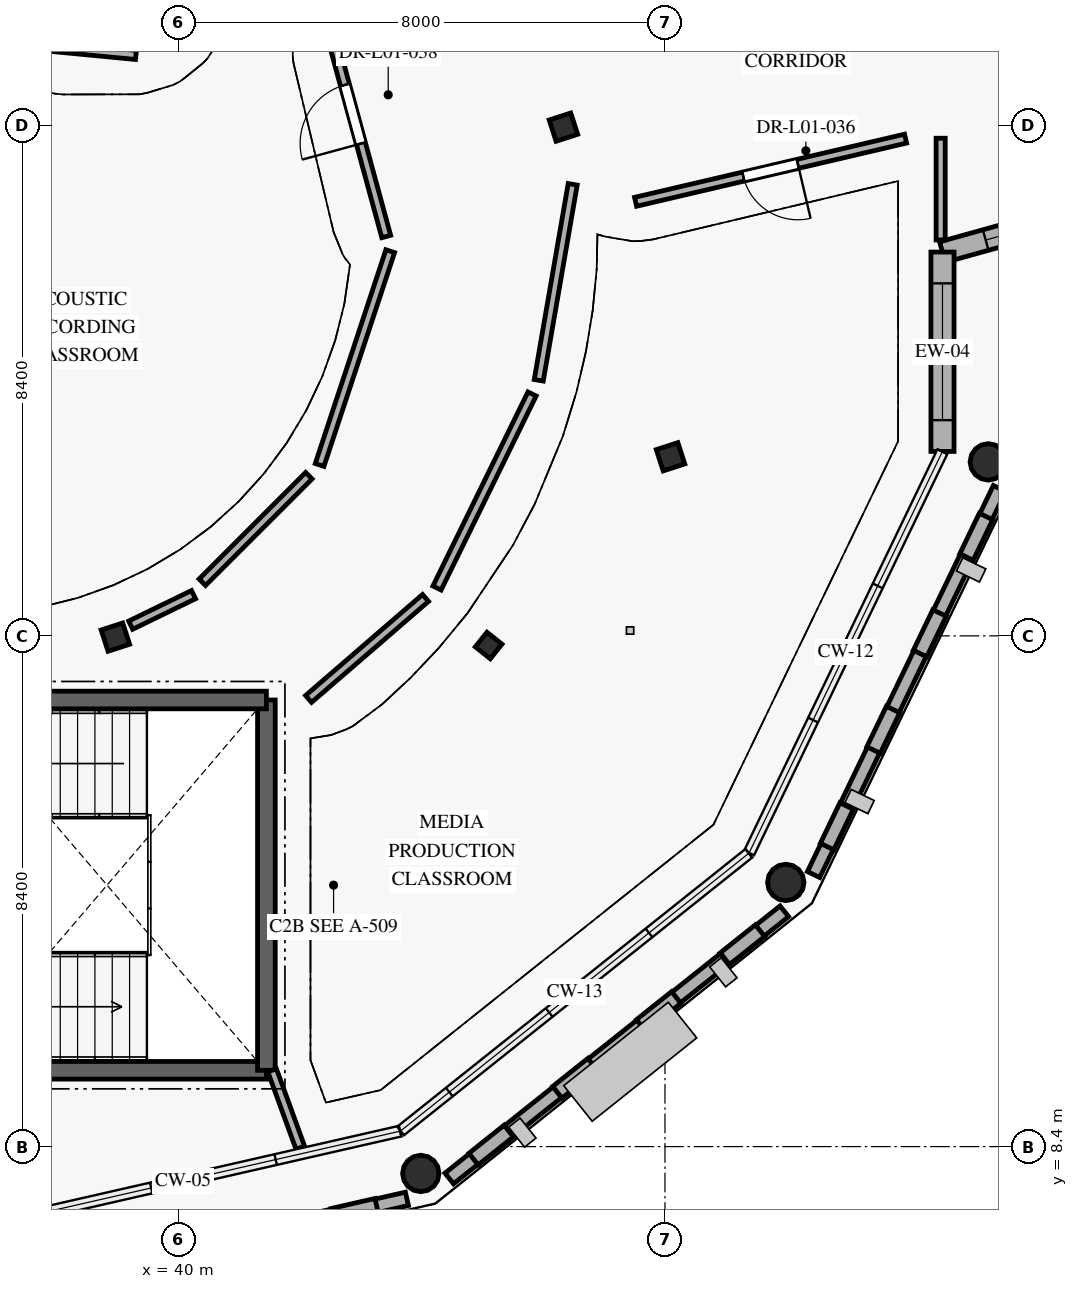
"""IFC4 building model, lengths in metres.
Left out: names, types, materials, properties, quantities, classifications, styles, units other than length and angle.
Written with IfcOpenShell. Run it as: python <this file> out.ifc"""

import sys

from ifc_helpers import new_model, si_unit, direction, frame, frame_2d, origin, origin_2d, place, context, subcontext, project, spatial, rectangle, circle, i_section, extrude, element, fill, save


model = new_model("IFC4")
c1 = context("Model", 3, precision=1e-05, world=origin(), true_north=direction((0.0, 1.0)))
c2 = subcontext(c1, "Body", "Model", "MODEL_VIEW")
j1 = project(units=[si_unit("LENGTHUNIT", "METRE"), si_unit("PLANEANGLEUNIT", "RADIAN")], contexts=[c1])
p1 = place(None, origin())
s1 = spatial("IfcSite", under=j1, at=p1, CompositionType="ELEMENT")
p2 = place(p1, origin())
s2 = spatial("IfcBuilding", under=s1, at=p2, CompositionType="ELEMENT")
p3 = place(p2, frame((0.0, 0.0, 4.2)))
s3 = spatial("IfcBuildingStorey", under=s2, at=p3, CompositionType="ELEMENT", Elevation=4.2)
for number, where, z_axis, x_axis in (
    (1, (38.961, 16.779, 0.0), (0.0, 0.0, 1.0), (0.951, 0.309, 0.0)),
    (2, (48.092, 19.746, 0.0), (0.0, 0.0, 1.0), (0.951, 0.309, 0.0)),
    (3, (46.33, 25.167, 0.0), (0.0, 0.0, 1.0), (0.951, 0.309, 0.0)),
):
    element("IfcColumn", number, at=place(p3, frame(where, z_axis=z_axis, x_axis=x_axis)), inside=s3, PredefinedType="COLUMN", context=c2, shape_type="SweptSolid", body=[
        extrude(i_section(OverallWidth=0.373, OverallDepth=0.368, WebThickness=0.014, FlangeThickness=0.024, FilletRadius=0.015, at=origin_2d()), origin(), (0.0, 0.0, 1.0), 4.2),
    ])
for number, where, z_axis, x_axis in (
    (4, (43.985, 7.958, 0.0), (0.0, 0.0, 1.0), (0.901, 0.434, 0.0)),
    (5, (49.987, 12.745, 0.0), (0.0, 0.0, 1.0), (0.623, 0.782, 0.0)),
    (6, (53.317, 19.662, 0.0), (0.0, 0.0, 1.0), (0.223, 0.975, 0.0)),
):
    element("IfcColumn", number, at=place(p3, frame(where, z_axis=z_axis, x_axis=x_axis)), inside=s3, PredefinedType="COLUMN", context=c2, shape_type="SweptSolid", body=[
        extrude(circle(Radius=0.3, at=origin_2d()), origin(), (0.0, 0.0, 1.0), 4.2),
    ])
p4 = place(p3, frame((45.1, 16.642, 0.0), z_axis=(0.0, 0.0, 1.0), x_axis=(0.623470308046, 0.781847027868, 0.0)))
e7 = element("IfcColumn", 7, at=p4, inside=s3, PredefinedType="COLUMN", context=c2, shape_type="SweptSolid", body=[
    extrude(i_section(OverallWidth=0.307, OverallDepth=0.314, WebThickness=0.012, FlangeThickness=0.019, FilletRadius=0.015, at=origin_2d()), origin(), (0.0, 0.0, 1.0), 4.2),
])
p5 = place(p3, frame((59.259, 24.975, 0.0), z_axis=(0.0, 0.0, 1.0), x_axis=(-0.963400554219, -0.268065984658, 0.0)))
e8 = element("IfcWall", 8, at=p5, inside=s3, PredefinedType="SOLIDWALL", context=c2, shape_type="SweptSolid", body=[
    extrude(rectangle(XDim=6.95, YDim=0.35, at=frame_2d((3.475, 0.0))), origin(), (0.0, 0.0, 1.0), 3.94),
])
p6 = place(p5, frame((0.988, 0.0, 0.85)))
e9 = element("IfcOpeningElement", 9, at=p6, cuts=e8, PredefinedType="OPENING", context=c2, shape_type="SweptSolid", body=[
    extrude(rectangle(XDim=1.5, YDim=1.3, at=frame_2d((0.75, 0.65))), frame((0.0, 0.185, 0.0), z_axis=(0.0, -1.0, 0.0), x_axis=(1.0, 0.0, 0.0)), (0.0, 0.0, 1.0), 0.37),
])
p7 = place(p5, frame((4.212, 0.0, 0.85)))
e10 = element("IfcOpeningElement", 10, at=p7, cuts=e8, PredefinedType="OPENING", context=c2, shape_type="SweptSolid", body=[
    extrude(rectangle(XDim=2.0, YDim=1.3, at=frame_2d((1.0, 0.65))), frame((0.0, 0.185, 0.0), z_axis=(0.0, -1.0, 0.0), x_axis=(1.0, 0.0, 0.0)), (0.0, 0.0, 1.0), 0.37),
])
p8 = place(p3, frame((52.564, 23.112, 0.0), z_axis=(0.0, 0.0, 1.0), x_axis=(0.0, -1.0, 0.0)))
e11 = element("IfcWall", 11, at=p8, inside=s3, PredefinedType="SOLIDWALL", context=c2, shape_type="SweptSolid", body=[
    extrude(rectangle(XDim=3.279, YDim=0.38, at=frame_2d((1.639, 0.0))), origin(), (0.0, 0.0, 1.0), 3.94),
])
p9 = place(p8, frame((0.514, 0.0, 0.85)))
e12 = element("IfcOpeningElement", 12, at=p9, cuts=e11, PredefinedType="OPENING", context=c2, shape_type="SweptSolid", body=[
    extrude(rectangle(XDim=2.25, YDim=1.3, at=frame_2d((1.125, 0.65))), frame((0.0, 0.2, 0.0), z_axis=(0.0, -1.0, 0.0), x_axis=(1.0, 0.0, 0.0)), (0.0, 0.0, 1.0), 0.4),
])
p10 = place(p3, frame((36.886, 5.973, 0.0), z_axis=(0.0, 0.0, 1.0), x_axis=(0.974930278984, 0.222510564064, 0.0)))
e13 = element("IfcWall", 13, at=p10, inside=s3, PredefinedType="ELEMENTEDWALL", context=c2, shape_type="SweptSolid", body=[
    extrude(rectangle(XDim=7.046, YDim=0.225, at=frame_2d((3.523, 0.0))), origin(), (0.0, 0.0, 1.0), 1.09),
])
p11 = place(p3, frame((42.537, 7.262, 1.09), z_axis=(0.0, 0.0, 1.0), x_axis=(0.974960788757, 0.222376843189, 0.0)))
e14 = element("IfcWall", 14, at=p11, inside=s3, PredefinedType="ELEMENTEDWALL", context=c2, shape_type="SweptSolid", body=[
    extrude(rectangle(XDim=0.74, YDim=0.245, at=frame_2d((0.37, 0.0))), origin(), (0.0, 0.0, 1.0), 2.85),
])
p12 = place(p3, frame((44.452, 7.876, 0.0), z_axis=(0.0, 0.0, 1.0), x_axis=(0.781844515492, 0.623473458613, 0.0)))
e15 = element("IfcWall", 15, at=p12, inside=s3, PredefinedType="ELEMENTEDWALL", context=c2, shape_type="SweptSolid", body=[
    extrude(rectangle(XDim=7.048, YDim=0.225, at=frame_2d((3.524, 0.0))), origin(), (0.0, 0.0, 1.0), 1.09),
])
for number, where, z_axis, x_axis in (
    (16, (44.852, 8.194, 1.09), (0.0, 0.0, 1.0), (0.782, 0.623, 0.0)),
    (17, (46.229, 9.293, 1.09), (0.0, 0.0, 1.0), (0.782, 0.623, 0.0)),
    (18, (47.607, 10.392, 1.09), (0.0, 0.0, 1.0), (0.782, 0.623, 0.0)),
    (19, (48.985, 11.49, 1.09), (0.0, 0.0, 1.0), (0.782, 0.623, 0.0)),
):
    element("IfcWall", number, at=place(p3, frame(where, z_axis=z_axis, x_axis=x_axis)), inside=s3, PredefinedType="ELEMENTEDWALL", context=c2, shape_type="SweptSolid", body=[
        extrude(rectangle(XDim=0.74, YDim=0.245, at=frame_2d((0.37, 0.0))), origin(), (0.0, 0.0, 1.0), 2.85),
    ])
p13 = place(p3, frame((50.444, 12.875, 0.0), z_axis=(0.0, 0.0, 1.0), x_axis=(0.433874990127, 0.900973081142, 0.0)))
e20 = element("IfcWall", 20, at=p13, inside=s3, PredefinedType="ELEMENTEDWALL", context=c2, shape_type="SweptSolid", body=[
    extrude(rectangle(XDim=7.047, YDim=0.225, at=frame_2d((3.523, 0.0))), origin(), (0.0, 0.0, 1.0), 1.09),
])
for number, where, z_axis, x_axis in (
    (21, (50.666, 13.335, 1.09), (0.0, 0.0, 1.0), (0.434, 0.901, 0.0)),
    (22, (51.43, 14.922, 1.09), (0.0, 0.0, 1.0), (0.434, 0.901, 0.0)),
):
    element("IfcWall", number, at=place(p3, frame(where, z_axis=z_axis, x_axis=x_axis)), inside=s3, PredefinedType="ELEMENTEDWALL", context=c2, shape_type="SweptSolid", body=[
        extrude(rectangle(XDim=0.74, YDim=0.245, at=frame_2d((0.37, 0.0))), origin(), (0.0, 0.0, 1.0), 2.85),
    ])
p14 = place(p3, frame((52.195, 16.51, 1.09), z_axis=(0.0, 0.0, 1.0), x_axis=(0.433964448544, 0.900929995837, 0.0)))
e23 = element("IfcWall", 23, at=p14, inside=s3, PredefinedType="ELEMENTEDWALL", context=c2, shape_type="SweptSolid", body=[
    extrude(rectangle(XDim=0.74, YDim=0.245, at=frame_2d((0.37, 0.0))), origin(), (0.0, 0.0, 1.0), 2.85),
])
p15 = place(p3, frame((52.959, 18.097, 1.09), z_axis=(0.0, 0.0, 1.0), x_axis=(0.433835457528, 0.900992117497, 0.0)))
e24 = element("IfcWall", 24, at=p15, inside=s3, PredefinedType="ELEMENTEDWALL", context=c2, shape_type="SweptSolid", body=[
    extrude(rectangle(XDim=0.74, YDim=0.245, at=frame_2d((0.37, 0.0))), origin(), (0.0, 0.0, 1.0), 2.85),
])
p16 = place(p3, frame((34.655, 9.655, 0.0), z_axis=(0.0, 0.0, 1.0), x_axis=(1.0, 0.0, 0.0)))
e25 = element("IfcWall", 25, at=p16, inside=s3, PredefinedType="SHEAR", context=c2, shape_type="SweptSolid", body=[
    extrude(rectangle(XDim=6.79, YDim=0.29, at=frame_2d((3.395, 0.0))), origin(), (0.0, 0.0, 1.0), 3.95),
])
p17 = place(p3, frame((41.445, 9.655, 0.0), z_axis=(0.0, 0.0, 1.0), x_axis=(0.0, 1.0, 0.0)))
e26 = element("IfcWall", 26, at=p17, inside=s3, PredefinedType="SHEAR", context=c2, shape_type="SweptSolid", body=[
    extrude(rectangle(XDim=6.09, YDim=0.29, at=frame_2d((3.045, 0.0))), origin(), (0.0, 0.0, 1.0), 3.95),
])
p18 = place(p3, frame((41.445, 15.745, 0.0), z_axis=(0.0, 0.0, 1.0), x_axis=(-1.0, 0.0, 0.0)))
e27 = element("IfcWall", 27, at=p18, inside=s3, PredefinedType="SHEAR", context=c2, shape_type="SweptSolid", body=[
    extrude(rectangle(XDim=6.79, YDim=0.29, at=frame_2d((3.395, 0.0))), origin(), (0.0, 0.0, 1.0), 3.95),
])
p19 = place(p3, frame((40.247, 17.478, 0.0), z_axis=(0.0, 0.0, 1.0), x_axis=(-0.899429373924, -0.437066129234, 0.0)))
e28 = element("IfcWall", 28, at=p19, inside=s3, PredefinedType="PARTITIONING", context=c2, shape_type="SweptSolid", body=[
    extrude(rectangle(XDim=1.148, YDim=0.15, at=frame_2d((0.574, 0.0))), origin(), (0.0, 0.0, 1.0), 3.219),
])
p20 = place(p3, frame((41.539, 9.655, 0.0), z_axis=(0.0, 0.0, 1.0), x_axis=(0.341945571893, -0.939719759217, 0.0)))
e29 = element("IfcWall", 29, at=p20, inside=s3, PredefinedType="PARTITIONING", context=c2, shape_type="SweptSolid", body=[
    extrude(rectangle(XDim=1.355, YDim=0.15, at=frame_2d((0.678, 0.0))), origin(), (0.0, 0.0, 1.0), 3.9),
])
p21 = place(p3, frame((51.957, 24.978, 0.0), z_axis=(0.0, 0.0, 1.0), x_axis=(-0.973682617982, -0.227908225917, 0.0)))
e30 = element("IfcWall", 30, at=p21, inside=s3, PredefinedType="PARTITIONING", context=c2, shape_type="SweptSolid", body=[
    extrude(rectangle(XDim=4.56, YDim=0.15, at=frame_2d((2.28, 0.0))), origin(), (0.0, 0.0, 1.0), 3.9),
])
p22 = place(p21, frame((1.82, 0.0, 0.0)))
e31 = element("IfcOpeningElement", 31, at=p22, cuts=e30, PredefinedType="OPENING", context=c2, shape_type="SweptSolid", body=[
    extrude(rectangle(XDim=0.92, YDim=2.08, at=frame_2d((0.46, 1.04))), frame((0.0, 0.085, 0.0), z_axis=(0.0, -1.0, 0.0), x_axis=(1.0, 0.0, 0.0)), (0.0, 0.0, 1.0), 0.17),
])
p23 = place(p3, frame((46.482, 24.226, 0.0), z_axis=(0.0, 0.0, 1.0), x_axis=(-0.170701699763, -0.985322754075, 0.0)))
e32 = element("IfcWall", 32, at=p23, inside=s3, PredefinedType="PARTITIONING", context=c2, shape_type="SweptSolid", body=[
    extrude(rectangle(XDim=3.271, YDim=0.15, at=frame_2d((1.635, 0.0))), origin(), (0.0, 0.0, 1.0), 3.9),
])
p24 = place(p3, frame((45.814, 20.779, 0.0), z_axis=(0.0, 0.0, 1.0), x_axis=(-0.439779254339, -0.89810589991, 0.0)))
e33 = element("IfcWall", 33, at=p24, inside=s3, PredefinedType="PARTITIONING", context=c2, shape_type="SweptSolid", body=[
    extrude(rectangle(XDim=3.554, YDim=0.15, at=frame_2d((1.777, 0.0))), origin(), (0.0, 0.0, 1.0), 3.9),
])
p25 = place(p3, frame((44.062, 17.424, 0.0), z_axis=(0.0, 0.0, 1.0), x_axis=(-0.756768999512, -0.653682401, 0.0)))
e34 = element("IfcWall", 34, at=p25, inside=s3, PredefinedType="PARTITIONING", context=c2, shape_type="SweptSolid", body=[
    extrude(rectangle(XDim=2.541, YDim=0.15, at=frame_2d((1.271, 0.0))), origin(), (0.0, 0.0, 1.0), 3.9),
])
p26 = place(p3, frame((42.32, 19.611, 0.0), z_axis=(0.0, 0.0, 1.0), x_axis=(0.313635484033, 0.949543460383, 0.0)))
e35 = element("IfcWall", 35, at=p26, inside=s3, PredefinedType="PARTITIONING", context=c2, shape_type="SweptSolid", body=[
    extrude(rectangle(XDim=3.703, YDim=0.15, at=frame_2d((1.852, 0.0))), origin(), (0.0, 0.0, 1.0), 3.9),
])
p27 = place(p3, frame((43.416, 23.368, 0.0), z_axis=(0.0, 0.0, 1.0), x_axis=(-0.262938935949, 0.964812477097, 0.0)))
e36 = element("IfcWall", 36, at=p27, inside=s3, PredefinedType="PARTITIONING", context=c2, shape_type="SweptSolid", body=[
    extrude(rectangle(XDim=4.167, YDim=0.15, at=frame_2d((2.083, 0.0))), origin(), (0.0, 0.0, 1.0), 3.9),
])
p28 = place(p27, frame((1.584, 0.0, 0.0)))
e37 = element("IfcOpeningElement", 37, at=p28, cuts=e36, PredefinedType="OPENING", context=c2, shape_type="SweptSolid", body=[
    extrude(rectangle(XDim=1.0, YDim=2.1, at=frame_2d((0.5, 1.05))), frame((0.0, 0.085, 0.0), z_axis=(0.0, -1.0, 0.0), x_axis=(1.0, 0.0, 0.0)), (0.0, 0.0, 1.0), 0.17),
])
p29 = place(p3, frame((39.3, 26.354, 0.0), z_axis=(0.0, 0.0, 1.0), x_axis=(-0.995426515274, 0.095530375746, 0.0)))
e38 = element("IfcWall", 38, at=p29, inside=s3, PredefinedType="PARTITIONING", context=c2, shape_type="SweptSolid", body=[
    extrude(rectangle(XDim=1.661, YDim=0.15, at=frame_2d((0.831, 0.0))), origin(), (0.0, 0.0, 1.0), 3.9),
])
p30 = place(p3, frame((40.391, 17.682, 0.0), z_axis=(0.0, 0.0, 1.0), x_axis=(0.70715603118, 0.707057527763, 0.0)))
e39 = element("IfcWall", 39, at=p30, inside=s3, PredefinedType="PARTITIONING", context=c2, shape_type="SweptSolid", body=[
    extrude(rectangle(XDim=2.479, YDim=0.15, at=frame_2d((1.239, 0.0))), origin(), (0.0, 0.0, 1.0), 3.9),
])
p31 = place(p3, frame((52.534, 24.984, 0.0), z_axis=(0.0, 0.0, 1.0), x_axis=(0.0, -1.0, 0.0)))
e40 = element("IfcWall", 40, at=p31, inside=s3, PredefinedType="PARTITIONING", context=c2, shape_type="SweptSolid", body=[
    extrude(rectangle(XDim=1.673, YDim=0.15, at=frame_2d((0.836, 0.0))), origin(), (0.0, 0.0, 1.0), 3.9),
])
p32 = place(p7, origin())
e41 = element("IfcWindow", 41, at=p32, inside=s3, PartitioningType="SINGLE_PANEL", PredefinedType="WINDOW", context=c2, shape_type="SweptSolid", body=[
    extrude(rectangle(XDim=2.0, YDim=1.3, at=frame_2d((1.0, 0.65))), frame((0.0, 0.03, 0.0), z_axis=(0.0, -1.0, 0.0), x_axis=(1.0, 0.0, 0.0)), (0.0, 0.0, 1.0), 0.06),
])
fill(e10, e41)
p33 = place(p9, origin())
e42 = element("IfcWindow", 42, at=p33, inside=s3, PartitioningType="SINGLE_PANEL", PredefinedType="WINDOW", context=c2, shape_type="SweptSolid", body=[
    extrude(rectangle(XDim=2.25, YDim=1.3, at=frame_2d((1.125, 0.65))), frame((0.0, 0.03, 0.0), z_axis=(0.0, -1.0, 0.0), x_axis=(1.0, 0.0, 0.0)), (0.0, 0.0, 1.0), 0.06),
])
fill(e12, e42)
p34 = place(p22, origin())
e43 = element("IfcDoor", 43, at=p34, inside=s3, OperationType="SINGLE_SWING_LEFT", PredefinedType="DOOR", context=c2, shape_type="SweptSolid", body=[
    extrude(rectangle(XDim=0.92, YDim=2.08, at=frame_2d((0.46, 1.04))), frame((0.0, 0.025, 0.0), z_axis=(0.0, -1.0, 0.0), x_axis=(1.0, 0.0, 0.0)), (0.0, 0.0, 1.0), 0.05),
])
fill(e31, e43)
p35 = place(p28, origin())
e44 = element("IfcDoor", 44, at=p35, inside=s3, OperationType="SINGLE_SWING_LEFT", PredefinedType="DOOR", context=c2, shape_type="SweptSolid", body=[
    extrude(rectangle(XDim=1.0, YDim=2.1, at=frame_2d((0.5, 1.05))), frame((0.0, 0.025, 0.0), z_axis=(0.0, -1.0, 0.0), x_axis=(1.0, 0.0, 0.0)), (0.0, 0.0, 1.0), 0.05),
])
fill(e37, e44)
save(model, sys.argv[1])
